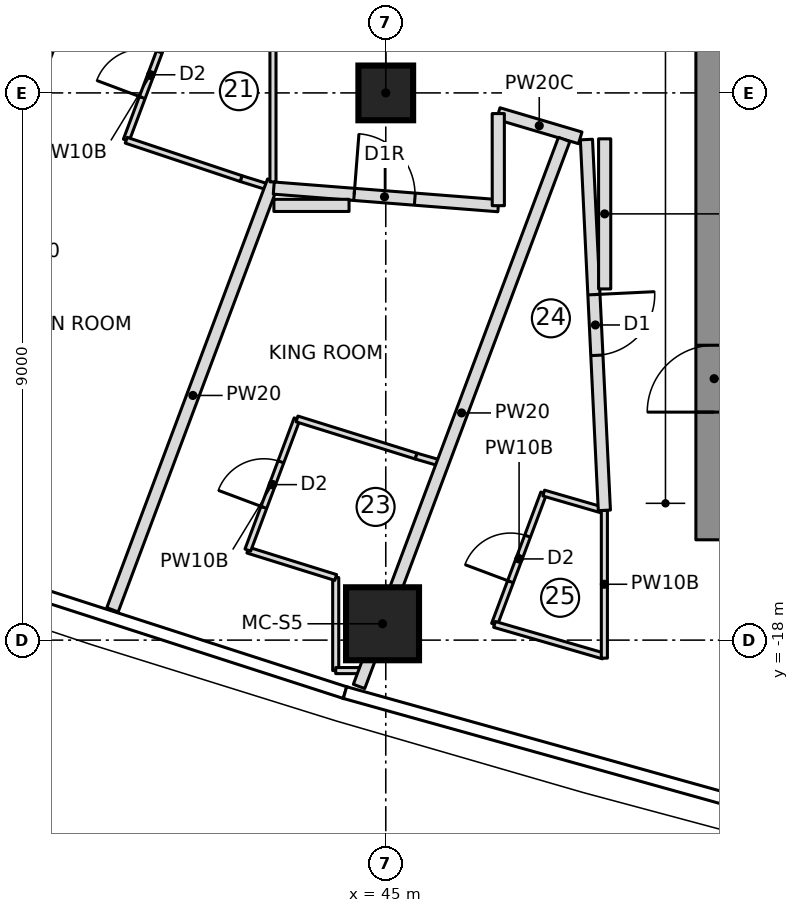
"""IFC4 building model, lengths in metres.
Left out: names, types, materials, properties, quantities, classifications, styles, units other than length and angle.
Written with IfcOpenShell. Run it as: python <this file> out.ifc"""

import sys

from ifc_helpers import new_model, si_unit, direction, frame, frame_2d, origin, origin_2d, place, context, subcontext, project, spatial, rectangle, extrude, element, fill, save


model = new_model("IFC4")
c1 = context("Model", 3, precision=1e-05, world=origin(), true_north=direction((0.0, 1.0)))
c2 = subcontext(c1, "Body", "Model", "MODEL_VIEW")
j1 = project(units=[si_unit("LENGTHUNIT", "METRE"), si_unit("PLANEANGLEUNIT", "RADIAN")], contexts=[c1])
p1 = place(None, origin())
s1 = spatial("IfcSite", under=j1, at=p1, CompositionType="ELEMENT")
p2 = place(p1, origin())
s2 = spatial("IfcBuilding", under=s1, at=p2, CompositionType="ELEMENT")
p3 = place(p2, frame((0.0, 0.0, 252.75)))
s3 = spatial("IfcBuildingStorey", under=s2, at=p3, CompositionType="ELEMENT", Elevation=252.75)
p4 = place(p3, frame((50.4, -16.35, 0.0), z_axis=(0.0, 0.0, 1.0), x_axis=(0.0, 1.0, 0.0)))
e1 = element("IfcWall", 1, at=p4, inside=s3, PredefinedType="SHEAR", context=c2, shape_type="SweptSolid", body=[
    extrude(rectangle(XDim=9.7, YDim=0.6, at=frame_2d((4.85, 0.0))), origin(), (0.0, 0.0, 1.0), 3.55),
])
p5 = place(p4, frame((2.1, 0.0, 0.0)))
e2 = element("IfcOpeningElement", 2, at=p5, cuts=e1, PredefinedType="OPENING", context=c2, shape_type="SweptSolid", body=[
    extrude(rectangle(XDim=1.1, YDim=2.1, at=frame_2d((0.55, 1.05))), frame((0.0, 0.31, 0.0), z_axis=(0.0, -1.0, 0.0), x_axis=(1.0, 0.0, 0.0)), (0.0, 0.0, 1.0), 0.62),
])
p6 = place(p3, frame((44.947, -17.731, 0.0), z_axis=(0.0, 0.0, 1.0), x_axis=(1.0, 0.0, 0.0)))
e3 = element("IfcColumn", 3, at=p6, inside=s3, PredefinedType="COLUMN", context=c2, shape_type="SweptSolid", body=[
    extrude(rectangle(XDim=1.2, YDim=1.2, at=origin_2d()), origin(), (0.0, 0.0, 1.0), 3.55),
])
p7 = place(p3, frame((45.0, -9.0, 0.0), z_axis=(0.0, 0.0, 1.0), x_axis=(1.0, 0.0, 0.0)))
e4 = element("IfcColumn", 4, at=p7, inside=s3, PredefinedType="COLUMN", context=c2, shape_type="SweptSolid", body=[
    extrude(rectangle(XDim=0.9, YDim=0.9, at=origin_2d()), origin(), (0.0, 0.0, 1.0), 3.55),
])
p8 = place(p3, frame((36.481, -16.161, 0.0), z_axis=(0.0, 0.0, 1.0), x_axis=(0.35112895446, 0.936327110224, 0.0)))
e5 = element("IfcWall", 5, at=p8, inside=s3, PredefinedType="PARTITIONING", context=c2, shape_type="SweptSolid", body=[
    extrude(rectangle(XDim=9.706, YDim=0.2, at=frame_2d((4.853, 0.0))), origin(), (0.0, 0.0, 1.0), 3.15),
])
p9 = place(p3, frame((40.732, -9.779, 0.0), z_axis=(0.0, 0.0, 1.0), x_axis=(0.351146927505, 0.936320370014, 0.0)))
e6 = element("IfcWall", 6, at=p9, inside=s3, PredefinedType="PARTITIONING", context=c2, shape_type="SweptSolid", body=[
    extrude(rectangle(XDim=2.278, YDim=0.1, at=frame_2d((1.139, 0.0))), origin(), (0.0, 0.0, 1.0), 3.15),
])
p10 = place(p9, frame((0.75, 0.0, 0.0)))
e7 = element("IfcOpeningElement", 7, at=p10, cuts=e6, PredefinedType="OPENING", context=c2, shape_type="SweptSolid", body=[
    extrude(rectangle(XDim=0.8, YDim=2.1, at=frame_2d((0.4, 1.05))), frame((0.0, 0.06, 0.0), z_axis=(0.0, -1.0, 0.0), x_axis=(1.0, 0.0, 0.0)), (0.0, 0.0, 1.0), 0.12),
])
p11 = place(p3, frame((43.108, -10.562, 0.0), z_axis=(0.0, 0.0, 1.0), x_axis=(-0.954624465478, 0.297812239356, 0.0)))
e8 = element("IfcWall", 8, at=p11, inside=s3, PredefinedType="PARTITIONING", context=c2, shape_type="SweptSolid", body=[
    extrude(rectangle(XDim=0.511, YDim=0.1, at=frame_2d((0.255, 0.0))), origin(), (0.0, 0.0, 1.0), 3.15),
])
p12 = place(p3, frame((42.621, -10.409, 0.0), z_axis=(0.0, 0.0, 1.0), x_axis=(-0.948499248693, 0.316779379426, 0.0)))
e9 = element("IfcWall", 9, at=p12, inside=s3, PredefinedType="PARTITIONING", context=c2, shape_type="SweptSolid", body=[
    extrude(rectangle(XDim=1.991, YDim=0.1, at=frame_2d((0.996, 0.0))), origin(), (0.0, 0.0, 1.0), 3.15),
])
p13 = place(p3, frame((40.506, -17.501, 0.0), z_axis=(0.0, 0.0, 1.0), x_axis=(0.351119888923, 0.936330509811, 0.0)))
e10 = element("IfcWall", 10, at=p13, inside=s3, PredefinedType="PARTITIONING", context=c2, shape_type="SweptSolid", body=[
    extrude(rectangle(XDim=7.531, YDim=0.2, at=frame_2d((3.766, 0.0))), origin(), (0.0, 0.0, 1.0), 3.15),
])
p14 = place(p3, frame((46.85, -9.34, 0.0), z_axis=(0.0, 0.0, 1.0), x_axis=(0.958866391875, -0.283857785753, 0.0)))
e11 = element("IfcWall", 11, at=p14, inside=s3, PredefinedType="PARTITIONING", context=c2, shape_type="SweptSolid", body=[
    extrude(rectangle(XDim=1.406, YDim=0.2, at=frame_2d((0.703, 0.0))), origin(), (0.0, 0.0, 1.0), 3.15),
])
p15 = place(p3, frame((44.177, -18.501, 0.0), z_axis=(0.0, 0.0, 1.0), x_axis=(0.0, 1.0, 0.0)))
e12 = element("IfcWall", 12, at=p15, inside=s3, PredefinedType="PARTITIONING", context=c2, shape_type="SweptSolid", body=[
    extrude(rectangle(XDim=1.531, YDim=0.1, at=frame_2d((0.766, 0.0))), origin(), (0.0, 0.0, 1.0), 3.15),
])
p16 = place(p3, frame((44.177, -16.97, 0.0), z_axis=(0.0, 0.0, 1.0), x_axis=(-0.954631901927, 0.297788401091, 0.0)))
e13 = element("IfcWall", 13, at=p16, inside=s3, PredefinedType="PARTITIONING", context=c2, shape_type="SweptSolid", body=[
    extrude(rectangle(XDim=1.514, YDim=0.1, at=frame_2d((0.757, 0.0))), origin(), (0.0, 0.0, 1.0), 3.15),
])
p17 = place(p3, frame((42.731, -16.519, 0.0), z_axis=(0.0, 0.0, 1.0), x_axis=(0.351111827312, 0.936333532841, 0.0)))
e14 = element("IfcWall", 14, at=p17, inside=s3, PredefinedType="PARTITIONING", context=c2, shape_type="SweptSolid", body=[
    extrude(rectangle(XDim=2.304, YDim=0.1, at=frame_2d((1.152, 0.0))), origin(), (0.0, 0.0, 1.0), 3.15),
])
p18 = place(p17, frame((0.75, 0.0, 0.0)))
e15 = element("IfcOpeningElement", 15, at=p18, cuts=e14, PredefinedType="OPENING", context=c2, shape_type="SweptSolid", body=[
    extrude(rectangle(XDim=0.8, YDim=2.1, at=frame_2d((0.4, 1.05))), frame((0.0, 0.06, 0.0), z_axis=(0.0, -1.0, 0.0), x_axis=(1.0, 0.0, 0.0)), (0.0, 0.0, 1.0), 0.12),
])
p19 = place(p3, frame((43.54, -14.362, 0.0), z_axis=(0.0, 0.0, 1.0), x_axis=(0.954642821531, -0.297753393432, 0.0)))
e16 = element("IfcWall", 16, at=p19, inside=s3, PredefinedType="PARTITIONING", context=c2, shape_type="SweptSolid", body=[
    extrude(rectangle(XDim=2.052, YDim=0.1, at=frame_2d((1.026, 0.0))), origin(), (0.0, 0.0, 1.0), 3.15),
])
p20 = place(p3, frame((45.499, -14.973, 0.0), z_axis=(0.0, 0.0, 1.0), x_axis=(0.960560469191, -0.278071186978, 0.0)))
e17 = element("IfcWall", 17, at=p20, inside=s3, PredefinedType="PARTITIONING", context=c2, shape_type="SweptSolid", body=[
    extrude(rectangle(XDim=0.452, YDim=0.1, at=frame_2d((0.226, 0.0))), origin(), (0.0, 0.0, 1.0), 3.15),
])
p21 = place(p3, frame((44.658, -18.501, 0.0), z_axis=(0.0, 0.0, 1.0), x_axis=(-1.0, 0.0, 0.0)))
e18 = element("IfcWall", 18, at=p21, inside=s3, PredefinedType="PARTITIONING", context=c2, shape_type="SweptSolid", body=[
    extrude(rectangle(XDim=0.481, YDim=0.1, at=frame_2d((0.241, 0.0))), origin(), (0.0, 0.0, 1.0), 3.15),
])
p22 = place(p3, frame((44.56, -18.762, 0.0), z_axis=(0.0, 0.0, 1.0), x_axis=(0.35112901071, 0.936327089129, 0.0)))
e19 = element("IfcWall", 19, at=p22, inside=s3, PredefinedType="PARTITIONING", context=c2, shape_type="SweptSolid", body=[
    extrude(rectangle(XDim=9.608, YDim=0.2, at=frame_2d((4.804, 0.0))), origin(), (0.0, 0.0, 1.0), 3.15),
])
p23 = place(p3, frame((46.788, -17.741, 0.0), z_axis=(0.0, 0.0, 1.0), x_axis=(0.351158236187, 0.936316128857, 0.0)))
e20 = element("IfcWall", 20, at=p23, inside=s3, PredefinedType="PARTITIONING", context=c2, shape_type="SweptSolid", body=[
    extrude(rectangle(XDim=2.307, YDim=0.1, at=frame_2d((1.153, 0.0))), origin(), (0.0, 0.0, 1.0), 3.15),
])
p24 = place(p23, frame((0.75, 0.0, 0.0)))
e21 = element("IfcOpeningElement", 21, at=p24, cuts=e20, PredefinedType="OPENING", context=c2, shape_type="SweptSolid", body=[
    extrude(rectangle(XDim=0.8, YDim=2.1, at=frame_2d((0.4, 1.05))), frame((0.0, 0.06, 0.0), z_axis=(0.0, -1.0, 0.0), x_axis=(1.0, 0.0, 0.0)), (0.0, 0.0, 1.0), 0.12),
])
p25 = place(p3, frame((47.598, -15.582, 0.0), z_axis=(0.0, 0.0, 1.0), x_axis=(0.960468222897, -0.278389642057, 0.0)))
e22 = element("IfcWall", 22, at=p25, inside=s3, PredefinedType="PARTITIONING", context=c2, shape_type="SweptSolid", body=[
    extrude(rectangle(XDim=1.019, YDim=0.1, at=frame_2d((0.51, 0.0))), origin(), (0.0, 0.0, 1.0), 3.15),
])
p26 = place(p3, frame((48.578, -18.26, 0.0), z_axis=(0.0, 0.0, 1.0), x_axis=(-0.960473980386, 0.278369777458, 0.0)))
e23 = element("IfcWall", 23, at=p26, inside=s3, PredefinedType="PARTITIONING", context=c2, shape_type="SweptSolid", body=[
    extrude(rectangle(XDim=1.864, YDim=0.1, at=frame_2d((0.932, 0.0))), origin(), (0.0, 0.0, 1.0), 3.15),
])
p27 = place(p3, frame((43.145, -8.165, 0.0), z_axis=(0.0, 0.0, 1.0), x_axis=(0.0, -1.0, 0.0)))
e24 = element("IfcWall", 24, at=p27, inside=s3, PredefinedType="PARTITIONING", context=c2, shape_type="SweptSolid", body=[
    extrude(rectangle(XDim=2.298, YDim=0.1, at=frame_2d((1.149, 0.0))), origin(), (0.0, 0.0, 1.0), 3.15),
])
p28 = place(p3, frame((48.595, -15.866, 0.0), z_axis=(0.0, 0.0, 1.0), x_axis=(0.0, -1.0, 0.0)))
e25 = element("IfcWall", 25, at=p28, inside=s3, PredefinedType="PARTITIONING", context=c2, shape_type="SweptSolid", body=[
    extrude(rectangle(XDim=2.431, YDim=0.1, at=frame_2d((1.215, 0.0))), origin(), (0.0, 0.0, 1.0), 3.15),
])
p29 = place(p3, frame((43.158, -10.565, 0.0), z_axis=(0.0, 0.0, 1.0), x_axis=(0.996940593543, -0.078162989617, 0.0)))
e26 = element("IfcWall", 26, at=p29, inside=s3, PredefinedType="PARTITIONING", context=c2, shape_type="SweptSolid", body=[
    extrude(rectangle(XDim=3.704, YDim=0.2, at=frame_2d((1.852, 0.0))), origin(), (0.0, 0.0, 1.0), 3.15),
])
p30 = place(p29, frame((1.327, 0.0, 0.0)))
e27 = element("IfcOpeningElement", 27, at=p30, cuts=e26, PredefinedType="OPENING", context=c2, shape_type="SweptSolid", body=[
    extrude(rectangle(XDim=1.0, YDim=2.1, at=frame_2d((0.5, 1.05))), frame((0.0, 0.11, 0.0), z_axis=(0.0, -1.0, 0.0), x_axis=(1.0, 0.0, 0.0)), (0.0, 0.0, 1.0), 0.22),
])
p31 = place(p3, frame((48.3, -9.767, 0.0), z_axis=(0.0, 0.0, 1.0), x_axis=(0.048302241024, -0.998832765538, 0.0)))
e28 = element("IfcWall", 28, at=p31, inside=s3, PredefinedType="PARTITIONING", context=c2, shape_type="SweptSolid", body=[
    extrude(rectangle(XDim=6.106, YDim=0.2, at=frame_2d((3.053, 0.0))), origin(), (0.0, 0.0, 1.0), 3.15),
])
p32 = place(p31, frame((2.553, 0.0, 0.0)))
e29 = element("IfcOpeningElement", 29, at=p32, cuts=e28, PredefinedType="OPENING", context=c2, shape_type="SweptSolid", body=[
    extrude(rectangle(XDim=1.0, YDim=2.1, at=frame_2d((0.5, 1.05))), frame((0.0, 0.11, 0.0), z_axis=(0.0, -1.0, 0.0), x_axis=(1.0, 0.0, 0.0)), (0.0, 0.0, 1.0), 0.22),
])
p33 = place(p3, frame((46.851, -10.855, 0.0), z_axis=(0.0, 0.0, 1.0), x_axis=(-0.000644641284, 0.999999792219, 0.0)))
e30 = element("IfcWall", 30, at=p33, inside=s3, PredefinedType="PARTITIONING", context=c2, shape_type="SweptSolid", body=[
    extrude(rectangle(XDim=1.515, YDim=0.2, at=frame_2d((0.757, 0.0))), origin(), (0.0, 0.0, 1.0), 3.15),
])
p34 = place(p3, frame((44.396, -10.85, 0.0), z_axis=(0.0, 0.0, 1.0), x_axis=(-1.0, 0.0, 0.0)))
e31 = element("IfcWall", 31, at=p34, inside=s3, PredefinedType="PARTITIONING", context=c2, shape_type="SweptSolid", body=[
    extrude(rectangle(XDim=1.236, YDim=0.2, at=frame_2d((0.618, 0.0))), origin(), (0.0, 0.0, 1.0), 3.15),
])
p35 = place(p3, frame((48.6, -12.224, 0.0), z_axis=(0.0, 0.0, 1.0), x_axis=(0.0, 1.0, 0.0)))
e32 = element("IfcWall", 32, at=p35, inside=s3, PredefinedType="PARTITIONING", context=c2, shape_type="SweptSolid", body=[
    extrude(rectangle(XDim=2.469, YDim=0.2, at=frame_2d((1.234, 0.0))), origin(), (0.0, 0.0, 1.0), 3.15),
])
p36 = place(p10, origin())
e33 = element("IfcDoor", 33, at=p36, inside=s3, OperationType="SINGLE_SWING_LEFT", PredefinedType="DOOR", context=c2, shape_type="SweptSolid", body=[
    extrude(rectangle(XDim=0.8, YDim=2.1, at=frame_2d((0.4, 1.05))), frame((0.0, 0.025, 0.0), z_axis=(0.0, -1.0, 0.0), x_axis=(1.0, 0.0, 0.0)), (0.0, 0.0, 1.0), 0.05),
])
fill(e7, e33)
p37 = place(p18, origin())
e34 = element("IfcDoor", 34, at=p37, inside=s3, OperationType="SINGLE_SWING_LEFT", PredefinedType="DOOR", context=c2, shape_type="SweptSolid", body=[
    extrude(rectangle(XDim=0.8, YDim=2.1, at=frame_2d((0.4, 1.05))), frame((0.0, 0.025, 0.0), z_axis=(0.0, -1.0, 0.0), x_axis=(1.0, 0.0, 0.0)), (0.0, 0.0, 1.0), 0.05),
])
fill(e15, e34)
p38 = place(p24, origin())
e35 = element("IfcDoor", 35, at=p38, inside=s3, OperationType="SINGLE_SWING_LEFT", PredefinedType="DOOR", context=c2, shape_type="SweptSolid", body=[
    extrude(rectangle(XDim=0.8, YDim=2.1, at=frame_2d((0.4, 1.05))), frame((0.0, 0.025, 0.0), z_axis=(0.0, -1.0, 0.0), x_axis=(1.0, 0.0, 0.0)), (0.0, 0.0, 1.0), 0.05),
])
fill(e21, e35)
p39 = place(p30, origin())
e36 = element("IfcDoor", 36, at=p39, inside=s3, OperationType="SINGLE_SWING_RIGHT", PredefinedType="DOOR", context=c2, shape_type="SweptSolid", body=[
    extrude(rectangle(XDim=1.0, YDim=2.1, at=frame_2d((0.5, 1.05))), frame((0.0, 0.025, 0.0), z_axis=(0.0, -1.0, 0.0), x_axis=(1.0, 0.0, 0.0)), (0.0, 0.0, 1.0), 0.05),
])
fill(e27, e36)
p40 = place(p32, origin())
e37 = element("IfcDoor", 37, at=p40, inside=s3, OperationType="SINGLE_SWING_LEFT", PredefinedType="DOOR", context=c2, shape_type="SweptSolid", body=[
    extrude(rectangle(XDim=1.0, YDim=2.1, at=frame_2d((0.5, 1.05))), frame((0.0, 0.025, 0.0), z_axis=(0.0, -1.0, 0.0), x_axis=(1.0, 0.0, 0.0)), (0.0, 0.0, 1.0), 0.05),
])
fill(e29, e37)
p41 = place(p5, origin())
e38 = element("IfcDoor", 38, at=p41, inside=s3, OperationType="SINGLE_SWING_RIGHT", PredefinedType="DOOR", context=c2, shape_type="SweptSolid", body=[
    extrude(rectangle(XDim=1.1, YDim=2.1, at=frame_2d((0.55, 1.05))), frame((0.0, 0.025, 0.0), z_axis=(0.0, -1.0, 0.0), x_axis=(1.0, 0.0, 0.0)), (0.0, 0.0, 1.0), 0.05),
])
fill(e2, e38)
save(model, sys.argv[1])
